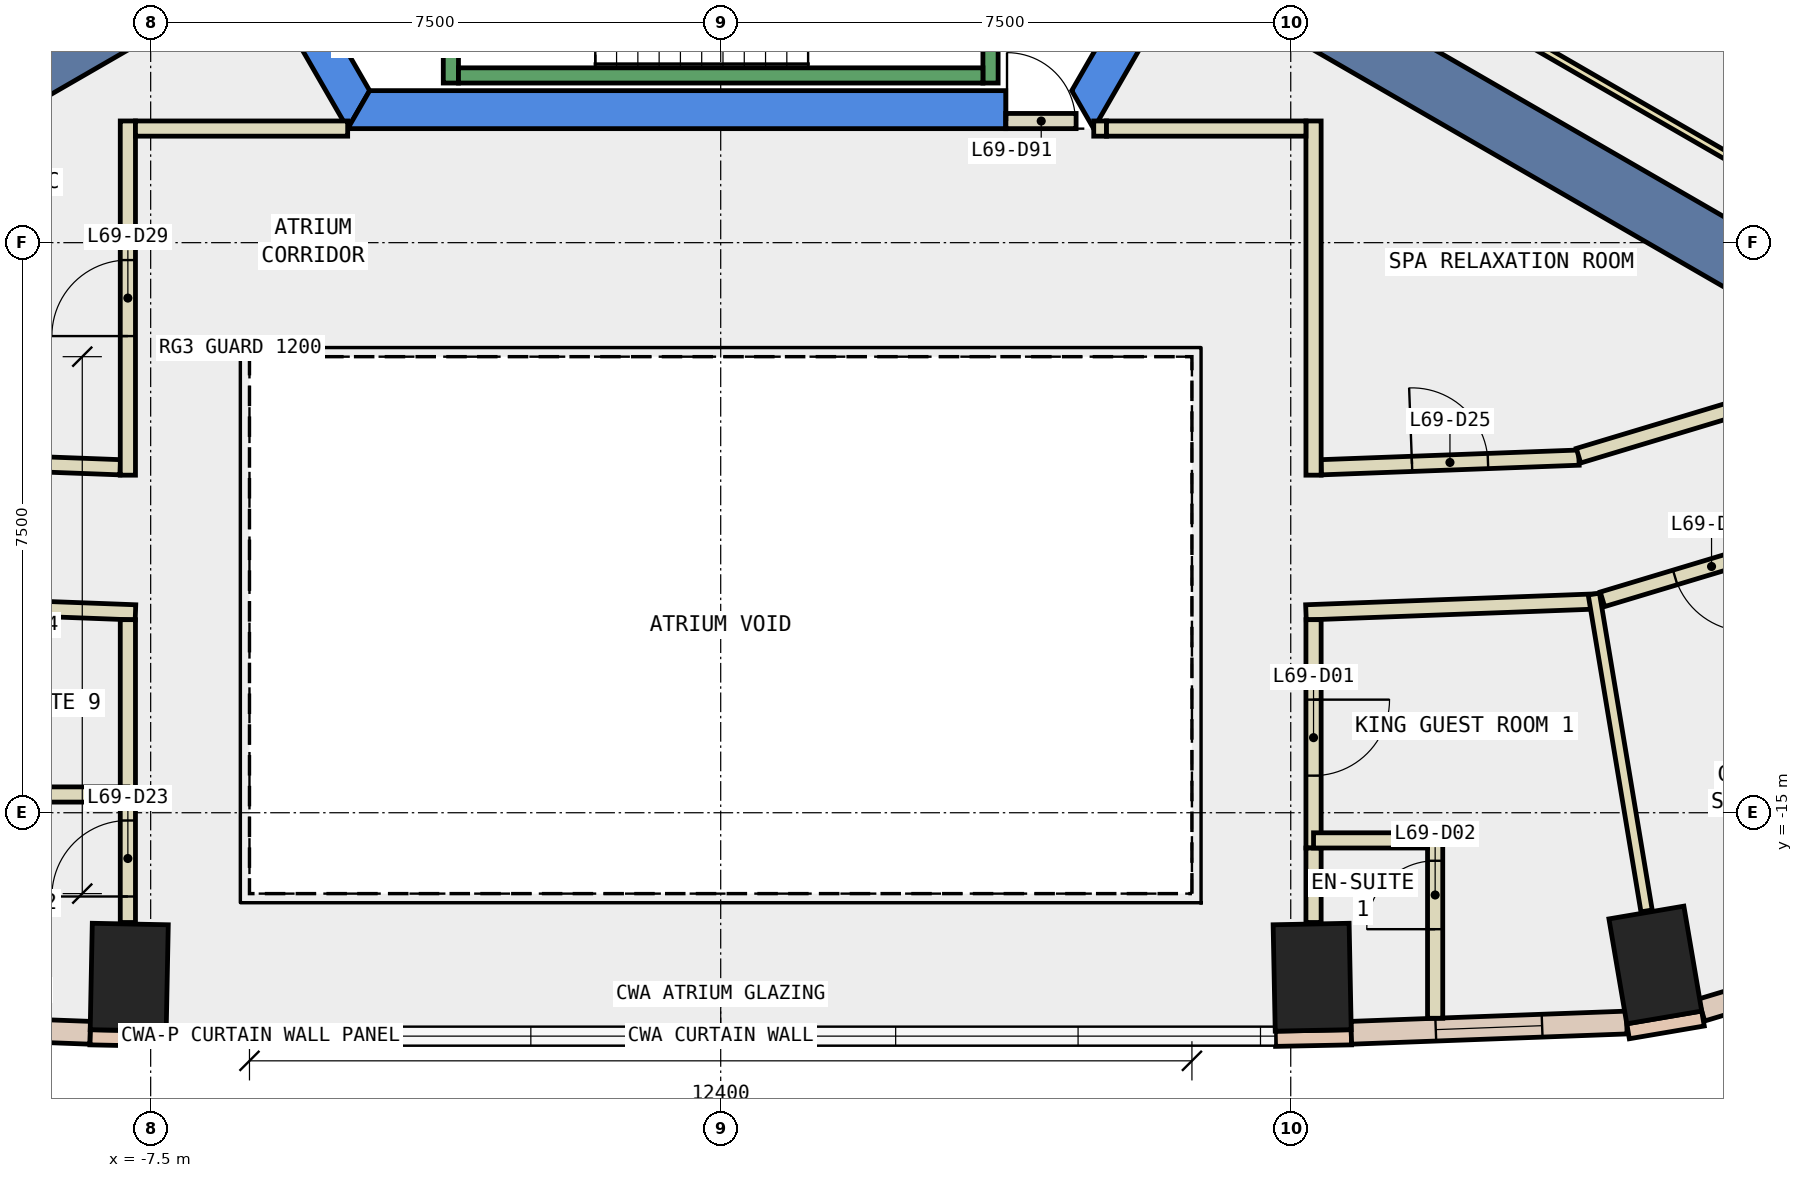
"""IFC4 building model, lengths in metres.
Left out: names, types, materials, properties, quantities, classifications, styles, units other than length and angle.
Written with IfcOpenShell. Run it as: python <this file> out.ifc"""

import sys

from ifc_helpers import new_model, si_unit, direction, frame, frame_2d, origin, origin_2d, place, context, subcontext, project, spatial, polyline, rectangle, outline, extrude, element, fill, save


model = new_model("IFC4")
c1 = context("Model", 3, precision=1e-05, world=origin(), true_north=direction((0.0, 1.0)))
c2 = subcontext(c1, "Body", "Model", "MODEL_VIEW")
j1 = project(units=[si_unit("LENGTHUNIT", "METRE"), si_unit("PLANEANGLEUNIT", "RADIAN")], contexts=[c1])
p1 = place(None, origin())
s1 = spatial("IfcSite", under=j1, at=p1, CompositionType="ELEMENT")
p2 = place(p1, origin())
s2 = spatial("IfcBuilding", under=s1, at=p2, CompositionType="ELEMENT")
p3 = place(p2, frame((0.0, 0.0, 297.2)))
s3 = spatial("IfcBuildingStorey", under=s2, at=p3, CompositionType="ELEMENT", Elevation=297.2)
for number, where, z_axis, x_axis in (
    (1, (-7.782, -17.164, -0.34), (0.0, 0.0, 1.0), (-1.0, 0.02, 0.0)),
    (2, (7.782, -17.164, -0.34), (0.0, 0.0, 1.0), (1.0, 0.02, 0.0)),
    (3, (12.297, -17.003, -0.34), (0.0, 0.0, 1.0), (0.986, 0.168, 0.0)),
):
    element("IfcColumn", number, at=place(p3, frame(where, z_axis=z_axis, x_axis=x_axis)), inside=s3, PredefinedType="COLUMN", context=c2, shape_type="SweptSolid", body=[
        extrude(rectangle(XDim=1.0, YDim=1.4, at=origin_2d()), origin(), (0.0, 0.0, 1.0), 3.6),
    ])
p4 = place(p3, frame((0.0, 0.0, -0.34)))
e4 = element("IfcWall", 4, at=p4, inside=s3, PredefinedType="SHEAR", context=c2, shape_type="SweptSolid", body=[
    extrude(outline(polyline([(-9.815, 2.5), (-4.907, -6.0), (-4.619, -5.5), (-9.238, 2.5), (-9.815, 2.5)])), origin(), (0.0, 0.0, 1.0), 3.6),
])
p5 = place(p3, frame((0.0, 0.0, -0.34)))
e5 = element("IfcWall", 5, at=p5, inside=s3, PredefinedType="SHEAR", context=c2, shape_type="SweptSolid", body=[
    extrude(outline(polyline([(3.75, -6.0), (3.75, -5.5), (-4.619, -5.5), (-4.907, -6.0), (3.75, -6.0)])), origin(), (0.0, 0.0, 1.0), 3.6),
])
p6 = place(p3, frame((0.0, 0.0, -0.34)))
e6 = element("IfcWall", 6, at=p6, inside=s3, PredefinedType="SHEAR", context=c2, shape_type="SweptSolid", body=[
    extrude(outline(polyline([(4.907, -6.0), (9.815, 2.5), (9.238, 2.5), (4.619, -5.5), (4.907, -6.0)])), origin(), (0.0, 0.0, 1.0), 3.6),
])
for number, where, z_axis, x_axis in (
    (7, (6.279, -3.625, -0.34), (0.0, 0.0, 1.0), (0.866, -0.5, 0.0)),
    (8, (-6.279, -3.625, -0.34), (0.0, 0.0, 1.0), (-0.866, -0.5, 0.0)),
):
    element("IfcWall", number, at=place(p3, frame(where, z_axis=z_axis, x_axis=x_axis)), inside=s3, PredefinedType="SHEAR", context=c2, shape_type="SweptSolid", body=[
        extrude(rectangle(XDim=9.0, YDim=0.8, at=frame_2d((4.5, 0.0))), origin(), (0.0, 0.0, 1.0), 3.6),
    ])
for number, where, z_axis, x_axis in (
    (9, (-8.298, -17.954, 0.0), (0.0, 0.0, 1.0), (1.0, -0.02, 0.0)),
    (10, (7.298, -17.974, 0.0), (0.0, 0.0, 1.0), (1.0, 0.02, 0.0)),
    (11, (11.938, -17.875, 0.0), (0.0, 0.0, 1.0), (0.986, 0.168, 0.0)),
):
    element("IfcWall", number, at=place(p3, frame(where, z_axis=z_axis, x_axis=x_axis)), inside=s3, PredefinedType="STANDARD", context=c2, shape_type="SweptSolid", body=[
        extrude(rectangle(XDim=1.0, YDim=0.2, at=frame_2d((0.5, 0.0))), origin(), (0.0, 0.0, 1.0), 3.26),
    ])
p7 = place(p3, frame((-11.92, -17.76, 0.0), z_axis=(0.0, 0.0, 1.0), x_axis=(0.999306787149, -0.037228284377, 0.0)))
e12 = element("IfcWall", 12, at=p7, inside=s3, PredefinedType="STANDARD", context=c2, shape_type="SweptSolid", body=[
    extrude(rectangle(XDim=3.626, YDim=0.3, at=frame_2d((1.813, 0.0))), origin(), (0.0, 0.0, 1.0), 3.26),
])
p8 = place(p7, frame((1.113, 0.0, 0.9)))
e13 = element("IfcOpeningElement", 13, at=p8, cuts=e12, PredefinedType="OPENING", context=c2, shape_type="SweptSolid", body=[
    extrude(rectangle(XDim=1.4, YDim=2.0, at=frame_2d((0.7, 1.0))), frame((0.0, 0.16, 0.0), z_axis=(0.0, -1.0, 0.0), x_axis=(1.0, 0.0, 0.0)), (0.0, 0.0, 1.0), 0.32),
])
p9 = place(p3, frame((8.296, -17.895, 0.0), z_axis=(0.0, 0.0, 1.0), x_axis=(0.999306787149, 0.037228284377, 0.0)))
e14 = element("IfcWall", 14, at=p9, inside=s3, PredefinedType="STANDARD", context=c2, shape_type="SweptSolid", body=[
    extrude(rectangle(XDim=3.626, YDim=0.3, at=frame_2d((1.813, 0.0))), origin(), (0.0, 0.0, 1.0), 3.26),
])
p10 = place(p9, frame((1.113, 0.0, 0.9)))
e15 = element("IfcOpeningElement", 15, at=p10, cuts=e14, PredefinedType="OPENING", context=c2, shape_type="SweptSolid", body=[
    extrude(rectangle(XDim=1.4, YDim=2.0, at=frame_2d((0.7, 1.0))), frame((0.0, 0.16, 0.0), z_axis=(0.0, -1.0, 0.0), x_axis=(1.0, 0.0, 0.0)), (0.0, 0.0, 1.0), 0.32),
])
p11 = place(p3, frame((12.904, -17.596, 0.0), z_axis=(0.0, 0.0, 1.0), x_axis=(0.957563190743, 0.288223412884, 0.0)))
e16 = element("IfcWall", 16, at=p11, inside=s3, PredefinedType="STANDARD", context=c2, shape_type="SweptSolid", body=[
    extrude(rectangle(XDim=4.4, YDim=0.3, at=frame_2d((2.2, 0.0))), origin(), (0.0, 0.0, 1.0), 3.26),
])
p12 = place(p11, frame((1.5, 0.0, 0.9)))
e17 = element("IfcOpeningElement", 17, at=p12, cuts=e16, PredefinedType="OPENING", context=c2, shape_type="SweptSolid", body=[
    extrude(rectangle(XDim=1.4, YDim=2.0, at=frame_2d((0.7, 1.0))), frame((0.0, 0.16, 0.0), z_axis=(0.0, -1.0, 0.0), x_axis=(1.0, 0.0, 0.0)), (0.0, 0.0, 1.0), 0.32),
])
p13 = place(p3, frame((7.9, -10.455, 0.0), z_axis=(0.0, 0.0, 1.0), x_axis=(0.999297278907, 0.037482640915, 0.0)))
e18 = element("IfcWall", 18, at=p13, inside=s3, PredefinedType="PARTITIONING", context=c2, shape_type="SweptSolid", body=[
    extrude(rectangle(XDim=3.394, YDim=0.2, at=frame_2d((1.697, 0.0))), origin(), (0.0, 0.0, 1.0), 3.26),
])
p14 = place(p13, frame((1.196, 0.0, 0.0)))
e19 = element("IfcOpeningElement", 19, at=p14, cuts=e18, PredefinedType="OPENING", context=c2, shape_type="SweptSolid", body=[
    extrude(rectangle(XDim=1.0, YDim=2.1, at=frame_2d((0.5, 1.05))), frame((0.0, 0.11, 0.0), z_axis=(0.0, -1.0, 0.0), x_axis=(1.0, 0.0, 0.0)), (0.0, 0.0, 1.0), 0.22),
])
p15 = place(p3, frame((11.286, -10.303, 0.0), z_axis=(0.0, 0.0, 1.0), x_axis=(0.957555754851, 0.288248115955, 0.0)))
e20 = element("IfcWall", 20, at=p15, inside=s3, PredefinedType="PARTITIONING", context=c2, shape_type="SweptSolid", body=[
    extrude(rectangle(XDim=2.612, YDim=0.2, at=frame_2d((1.306, 0.0))), origin(), (0.0, 0.0, 1.0), 3.26),
])
p16 = place(p3, frame((-9.902, -10.38, 0.0), z_axis=(0.0, 0.0, 1.0), x_axis=(0.999295503749, -0.037529937222, 0.0)))
e21 = element("IfcWall", 21, at=p16, inside=s3, PredefinedType="PARTITIONING", context=c2, shape_type="SweptSolid", body=[
    extrude(rectangle(XDim=2.004, YDim=0.2, at=frame_2d((1.002, 0.0))), origin(), (0.0, 0.0, 1.0), 3.26),
])
p17 = place(p3, frame((11.53, -12.22, 0.0), z_axis=(0.0, 0.0, 1.0), x_axis=(-0.999293554816, -0.037581794833, 0.0)))
e22 = element("IfcWall", 22, at=p17, inside=s3, PredefinedType="PARTITIONING", context=c2, shape_type="SweptSolid", body=[
    extrude(rectangle(XDim=3.833, YDim=0.2, at=frame_2d((1.917, 0.0))), origin(), (0.0, 0.0, 1.0), 3.26),
])
p18 = place(p3, frame((14.473, -11.328, 0.0), z_axis=(0.0, 0.0, 1.0), x_axis=(-0.957599689503, -0.288102125406, 0.0)))
e23 = element("IfcWall", 23, at=p18, inside=s3, PredefinedType="PARTITIONING", context=c2, shape_type="SweptSolid", body=[
    extrude(rectangle(XDim=2.999, YDim=0.2, at=frame_2d((1.5, 0.0))), origin(), (0.0, 0.0, 1.0), 3.26),
])
p19 = place(p18, frame((1.0, 0.0, 0.0)))
e24 = element("IfcOpeningElement", 24, at=p19, cuts=e23, PredefinedType="OPENING", context=c2, shape_type="SweptSolid", body=[
    extrude(rectangle(XDim=1.0, YDim=2.1, at=frame_2d((0.5, 1.05))), frame((0.0, 0.11, 0.0), z_axis=(0.0, -1.0, 0.0), x_axis=(1.0, 0.0, 0.0)), (0.0, 0.0, 1.0), 0.22),
])
p20 = place(p3, frame((-7.7, -12.364, 0.0), z_axis=(0.0, 0.0, 1.0), x_axis=(-0.999295758095, 0.037523164215, 0.0)))
e25 = element("IfcWall", 25, at=p20, inside=s3, PredefinedType="PARTITIONING", context=c2, shape_type="SweptSolid", body=[
    extrude(rectangle(XDim=2.401, YDim=0.2, at=frame_2d((1.2, 0.0))), origin(), (0.0, 0.0, 1.0), 3.26),
])
p21 = place(p3, frame((4.908, -5.999, 0.0), z_axis=(0.0, 0.0, 1.0), x_axis=(1.0, 0.0, 0.0)))
e26 = element("IfcWall", 26, at=p21, inside=s3, PredefinedType="PARTITIONING", context=c2, shape_type="SweptSolid", body=[
    extrude(rectangle(XDim=0.168, YDim=0.2, at=frame_2d((0.084, 0.0))), origin(), (0.0, 0.0, 1.0), 2.4),
])
p22 = place(p3, frame((7.8, -5.899, 0.0), z_axis=(0.0, 0.0, 1.0), x_axis=(0.0, -1.0, 0.0)))
e27 = element("IfcWall", 27, at=p22, inside=s3, PredefinedType="PARTITIONING", context=c2, shape_type="SweptSolid", body=[
    extrude(rectangle(XDim=4.66, YDim=0.2, at=frame_2d((2.33, 0.0))), origin(), (0.0, 0.0, 1.0), 3.26),
])
p23 = place(p3, frame((-7.8, -10.559, 0.0), z_axis=(0.0, 0.0, 1.0), x_axis=(0.0, 1.0, 0.0)))
e28 = element("IfcWall", 28, at=p23, inside=s3, PredefinedType="PARTITIONING", context=c2, shape_type="SweptSolid", body=[
    extrude(rectangle(XDim=4.66, YDim=0.2, at=frame_2d((2.33, 0.0))), origin(), (0.0, 0.0, 1.0), 3.26),
])
p24 = place(p23, frame((1.83, 0.0, 0.0)))
e29 = element("IfcOpeningElement", 29, at=p24, cuts=e28, PredefinedType="OPENING", context=c2, shape_type="SweptSolid", body=[
    extrude(rectangle(XDim=1.0, YDim=2.1, at=frame_2d((0.5, 1.05))), frame((0.0, 0.11, 0.0), z_axis=(0.0, -1.0, 0.0), x_axis=(1.0, 0.0, 0.0)), (0.0, 0.0, 1.0), 0.22),
])
p25 = place(p3, frame((-7.7, -5.999, 0.0), z_axis=(0.0, 0.0, 1.0), x_axis=(1.0, 0.0, 0.0)))
e30 = element("IfcWall", 30, at=p25, inside=s3, PredefinedType="PARTITIONING", context=c2, shape_type="SweptSolid", body=[
    extrude(rectangle(XDim=2.792, YDim=0.2, at=frame_2d((1.396, 0.0))), origin(), (0.0, 0.0, 1.0), 3.26),
])
p26 = place(p3, frame((7.8, -12.46, 0.0), z_axis=(0.0, 0.0, 1.0), x_axis=(0.0, -1.0, 0.0)))
e31 = element("IfcWall", 31, at=p26, inside=s3, PredefinedType="PARTITIONING", context=c2, shape_type="SweptSolid", body=[
    extrude(rectangle(XDim=3.004, YDim=0.2, at=frame_2d((1.502, 0.0))), origin(), (0.0, 0.0, 1.0), 3.26),
])
p27 = place(p26, frame((1.052, 0.0, 0.0)))
e32 = element("IfcOpeningElement", 32, at=p27, cuts=e31, PredefinedType="OPENING", context=c2, shape_type="SweptSolid", body=[
    extrude(rectangle(XDim=1.0, YDim=2.1, at=frame_2d((0.5, 1.05))), frame((0.0, 0.11, 0.0), z_axis=(0.0, -1.0, 0.0), x_axis=(1.0, 0.0, 0.0)), (0.0, 0.0, 1.0), 0.22),
])
p28 = place(p3, frame((7.8, -15.464, 0.0), z_axis=(0.0, 0.0, 1.0), x_axis=(0.0, -1.0, 0.0)))
e33 = element("IfcWall", 33, at=p28, inside=s3, PredefinedType="PARTITIONING", context=c2, shape_type="SweptSolid", body=[
    extrude(rectangle(XDim=0.98, YDim=0.2, at=frame_2d((0.49, 0.0))), origin(), (0.0, 0.0, 1.0), 3.26),
])
p29 = place(p3, frame((-7.8, -16.444, 0.0), z_axis=(0.0, 0.0, 1.0), x_axis=(0.0, 1.0, 0.0)))
e34 = element("IfcWall", 34, at=p29, inside=s3, PredefinedType="PARTITIONING", context=c2, shape_type="SweptSolid", body=[
    extrude(rectangle(XDim=1.584, YDim=0.2, at=frame_2d((0.792, 0.0))), origin(), (0.0, 0.0, 1.0), 3.26),
])
p30 = place(p29, frame((0.342, 0.0, 0.0)))
e35 = element("IfcOpeningElement", 35, at=p30, cuts=e34, PredefinedType="OPENING", context=c2, shape_type="SweptSolid", body=[
    extrude(rectangle(XDim=1.0, YDim=2.1, at=frame_2d((0.5, 1.05))), frame((0.0, 0.11, 0.0), z_axis=(0.0, -1.0, 0.0), x_axis=(1.0, 0.0, 0.0)), (0.0, 0.0, 1.0), 0.22),
])
p31 = place(p3, frame((-7.8, -14.86, 0.0), z_axis=(0.0, 0.0, 1.0), x_axis=(0.0, 1.0, 0.0)))
e36 = element("IfcWall", 36, at=p31, inside=s3, PredefinedType="PARTITIONING", context=c2, shape_type="SweptSolid", body=[
    extrude(rectangle(XDim=2.4, YDim=0.2, at=frame_2d((1.2, 0.0))), origin(), (0.0, 0.0, 1.0), 3.26),
])
p32 = place(p3, frame((6.835, -2.662, 0.0), z_axis=(0.0, 0.0, 1.0), x_axis=(0.866023427642, -0.500003422764, 0.0)))
e37 = element("IfcWall", 37, at=p32, inside=s3, PredefinedType="PARTITIONING", context=c2, shape_type="SweptSolid", body=[
    extrude(rectangle(XDim=8.65, YDim=0.1, at=frame_2d((4.325, 0.0))), origin(), (0.0, 0.0, 1.0), 3.26),
])
p33 = place(p3, frame((-6.804, -2.714, 0.0), z_axis=(0.0, 0.0, 1.0), x_axis=(-0.866057565063, -0.499944290893, 0.0)))
e38 = element("IfcWall", 38, at=p33, inside=s3, PredefinedType="PARTITIONING", context=c2, shape_type="SweptSolid", body=[
    extrude(rectangle(XDim=6.7, YDim=0.2, at=frame_2d((3.35, 0.0))), origin(), (0.0, 0.0, 1.0), 3.26),
])
p34 = place(p3, frame((9.4, -17.704, 0.0), z_axis=(0.0, 0.0, 1.0), x_axis=(0.0, 1.0, 0.0)))
e39 = element("IfcWall", 39, at=p34, inside=s3, PredefinedType="PARTITIONING", context=c2, shape_type="SweptSolid", body=[
    extrude(rectangle(XDim=2.44, YDim=0.2, at=frame_2d((1.22, 0.0))), origin(), (0.0, 0.0, 1.0), 3.26),
])
p35 = place(p34, frame((1.172, 0.0, 0.0)))
e40 = element("IfcOpeningElement", 40, at=p35, cuts=e39, PredefinedType="OPENING", context=c2, shape_type="SweptSolid", body=[
    extrude(rectangle(XDim=0.9, YDim=2.1, at=frame_2d((0.45, 1.05))), frame((0.0, 0.11, 0.0), z_axis=(0.0, -1.0, 0.0), x_axis=(1.0, 0.0, 0.0)), (0.0, 0.0, 1.0), 0.22),
])
p36 = place(p3, frame((9.3, -15.364, 0.0), z_axis=(0.0, 0.0, 1.0), x_axis=(-1.0, 0.0, 0.0)))
e41 = element("IfcWall", 41, at=p36, inside=s3, PredefinedType="PARTITIONING", context=c2, shape_type="SweptSolid", body=[
    extrude(rectangle(XDim=1.5, YDim=0.2, at=frame_2d((0.75, 0.0))), origin(), (0.0, 0.0, 1.0), 3.26),
])
p37 = place(p3, frame((11.488, -12.123, 0.0), z_axis=(0.0, 0.0, 1.0), x_axis=(0.164174159643, -0.986431368776, 0.0)))
e42 = element("IfcWall", 42, at=p37, inside=s3, PredefinedType="PARTITIONING", context=c2, shape_type="SweptSolid", body=[
    extrude(rectangle(XDim=4.226, YDim=0.15, at=frame_2d((2.113, 0.0))), origin(), (0.0, 0.0, 1.0), 3.26),
])
p38 = place(p3, frame((-10.1, -14.76, 0.0), z_axis=(0.0, 0.0, 1.0), x_axis=(1.0, 0.0, 0.0)))
e43 = element("IfcWall", 43, at=p38, inside=s3, PredefinedType="PARTITIONING", context=c2, shape_type="SweptSolid", body=[
    extrude(rectangle(XDim=2.3, YDim=0.2, at=frame_2d((1.15, 0.0))), origin(), (0.0, 0.0, 1.0), 3.26),
])
p39 = place(p3, frame((3.75, -5.9, 0.0), z_axis=(0.0, 0.0, 1.0), x_axis=(1.0, 0.0, 0.0)))
e44 = element("IfcWall", 44, at=p39, inside=s3, PredefinedType="PARTITIONING", context=c2, shape_type="SweptSolid", body=[
    extrude(rectangle(XDim=0.926, YDim=0.2, at=frame_2d((0.463, 0.0))), origin(), (0.0, 0.0, 1.0), 2.4),
])
p40 = place(p39, frame((0.017, 0.0, 0.0)))
e45 = element("IfcOpeningElement", 45, at=p40, cuts=e44, PredefinedType="OPENING", context=c2, shape_type="SweptSolid", body=[
    extrude(rectangle(XDim=0.9, YDim=2.1, at=frame_2d((0.45, 1.05))), frame((0.0, 0.11, 0.0), z_axis=(0.0, -1.0, 0.0), x_axis=(1.0, 0.0, 0.0)), (0.0, 0.0, 1.0), 0.22),
])
p41 = place(p3, frame((5.076, -5.999, 0.0), z_axis=(0.0, 0.0, 1.0), x_axis=(1.0, 0.0, 0.0)))
e46 = element("IfcWall", 46, at=p41, inside=s3, PredefinedType="PARTITIONING", context=c2, shape_type="SweptSolid", body=[
    extrude(rectangle(XDim=2.624, YDim=0.2, at=frame_2d((1.312, 0.0))), origin(), (0.0, 0.0, 1.0), 3.26),
])
p42 = place(p3, frame((-3.55, -1.0, 0.0), z_axis=(0.0, 0.0, 1.0), x_axis=(0.0, -1.0, 0.0)))
e47 = element("IfcWall", 47, at=p42, inside=s3, PredefinedType="STANDARD", context=c2, shape_type="SweptSolid", body=[
    extrude(rectangle(XDim=4.4, YDim=0.2, at=frame_2d((2.2, 0.0))), origin(), (0.0, 0.0, 1.0), 3.26),
])
p43 = place(p42, frame((2.4, 0.0, 0.0)))
e48 = element("IfcOpeningElement", 48, at=p43, cuts=e47, PredefinedType="OPENING", context=c2, shape_type="SweptSolid", body=[
    extrude(rectangle(XDim=1.1, YDim=2.2, at=frame_2d((0.55, 1.1))), frame((0.0, 0.11, 0.0), z_axis=(0.0, -1.0, 0.0), x_axis=(1.0, 0.0, 0.0)), (0.0, 0.0, 1.0), 0.22),
])
p44 = place(p3, frame((3.55, -2.667, 0.0), z_axis=(0.0, 0.0, 1.0), x_axis=(0.0, -1.0, 0.0)))
e49 = element("IfcWall", 49, at=p44, inside=s3, PredefinedType="STANDARD", context=c2, shape_type="SweptSolid", body=[
    extrude(rectangle(XDim=2.733, YDim=0.2, at=frame_2d((1.366, 0.0))), origin(), (0.0, 0.0, 1.0), 3.26),
])
p45 = place(p3, frame((-3.45, -5.3, 0.0), z_axis=(0.0, 0.0, 1.0), x_axis=(1.0, 0.0, 0.0)))
e50 = element("IfcWall", 50, at=p45, inside=s3, PredefinedType="STANDARD", context=c2, shape_type="SweptSolid", body=[
    extrude(rectangle(XDim=6.9, YDim=0.2, at=frame_2d((3.45, 0.0))), origin(), (0.0, 0.0, 1.0), 3.26),
])
p46 = place(p10, origin())
e51 = element("IfcWindow", 51, at=p46, inside=s3, PartitioningType="SINGLE_PANEL", PredefinedType="WINDOW", context=c2, shape_type="SweptSolid", body=[
    extrude(rectangle(XDim=1.4, YDim=2.0, at=frame_2d((0.7, 1.0))), frame((0.0, 0.03, 0.0), z_axis=(0.0, -1.0, 0.0), x_axis=(1.0, 0.0, 0.0)), (0.0, 0.0, 1.0), 0.06),
])
fill(e15, e51)
p47 = place(p27, origin())
e52 = element("IfcDoor", 52, at=p47, inside=s3, OperationType="SINGLE_SWING_RIGHT", PredefinedType="DOOR", context=c2, shape_type="SweptSolid", body=[
    extrude(rectangle(XDim=1.0, YDim=2.1, at=frame_2d((0.5, 1.05))), frame((0.0, 0.025, 0.0), z_axis=(0.0, -1.0, 0.0), x_axis=(1.0, 0.0, 0.0)), (0.0, 0.0, 1.0), 0.05),
])
fill(e32, e52)
p48 = place(p35, origin())
e53 = element("IfcDoor", 53, at=p48, inside=s3, OperationType="SINGLE_SWING_RIGHT", PredefinedType="DOOR", context=c2, shape_type="SweptSolid", body=[
    extrude(rectangle(XDim=0.9, YDim=2.1, at=frame_2d((0.45, 1.05))), frame((0.0, 0.025, 0.0), z_axis=(0.0, -1.0, 0.0), x_axis=(1.0, 0.0, 0.0)), (0.0, 0.0, 1.0), 0.05),
])
fill(e40, e53)
p49 = place(p19, origin())
e54 = element("IfcDoor", 54, at=p49, inside=s3, OperationType="SINGLE_SWING_LEFT", PredefinedType="DOOR", context=c2, shape_type="SweptSolid", body=[
    extrude(rectangle(XDim=1.0, YDim=2.1, at=frame_2d((0.5, 1.05))), frame((0.0, 0.025, 0.0), z_axis=(0.0, -1.0, 0.0), x_axis=(1.0, 0.0, 0.0)), (0.0, 0.0, 1.0), 0.05),
])
fill(e24, e54)
p50 = place(p30, origin())
e55 = element("IfcDoor", 55, at=p50, inside=s3, OperationType="SINGLE_SWING_RIGHT", PredefinedType="DOOR", context=c2, shape_type="SweptSolid", body=[
    extrude(rectangle(XDim=1.0, YDim=2.1, at=frame_2d((0.5, 1.05))), frame((0.0, 0.025, 0.0), z_axis=(0.0, -1.0, 0.0), x_axis=(1.0, 0.0, 0.0)), (0.0, 0.0, 1.0), 0.05),
])
fill(e35, e55)
p51 = place(p14, origin())
e56 = element("IfcDoor", 56, at=p51, inside=s3, OperationType="SINGLE_SWING_LEFT", PredefinedType="DOOR", context=c2, shape_type="SweptSolid", body=[
    extrude(rectangle(XDim=1.0, YDim=2.1, at=frame_2d((0.5, 1.05))), frame((0.0, 0.025, 0.0), z_axis=(0.0, -1.0, 0.0), x_axis=(1.0, 0.0, 0.0)), (0.0, 0.0, 1.0), 0.05),
])
fill(e19, e56)
p52 = place(p24, origin())
e57 = element("IfcDoor", 57, at=p52, inside=s3, OperationType="SINGLE_SWING_LEFT", PredefinedType="DOOR", context=c2, shape_type="SweptSolid", body=[
    extrude(rectangle(XDim=1.0, YDim=2.1, at=frame_2d((0.5, 1.05))), frame((0.0, 0.025, 0.0), z_axis=(0.0, -1.0, 0.0), x_axis=(1.0, 0.0, 0.0)), (0.0, 0.0, 1.0), 0.05),
])
fill(e29, e57)
p53 = place(p40, origin())
e58 = element("IfcDoor", 58, at=p53, inside=s3, OperationType="SINGLE_SWING_LEFT", PredefinedType="DOOR", context=c2, shape_type="SweptSolid", body=[
    extrude(rectangle(XDim=0.9, YDim=2.1, at=frame_2d((0.45, 1.05))), frame((0.0, 0.025, 0.0), z_axis=(0.0, -1.0, 0.0), x_axis=(1.0, 0.0, 0.0)), (0.0, 0.0, 1.0), 0.05),
])
fill(e45, e58)
save(model, sys.argv[1])
